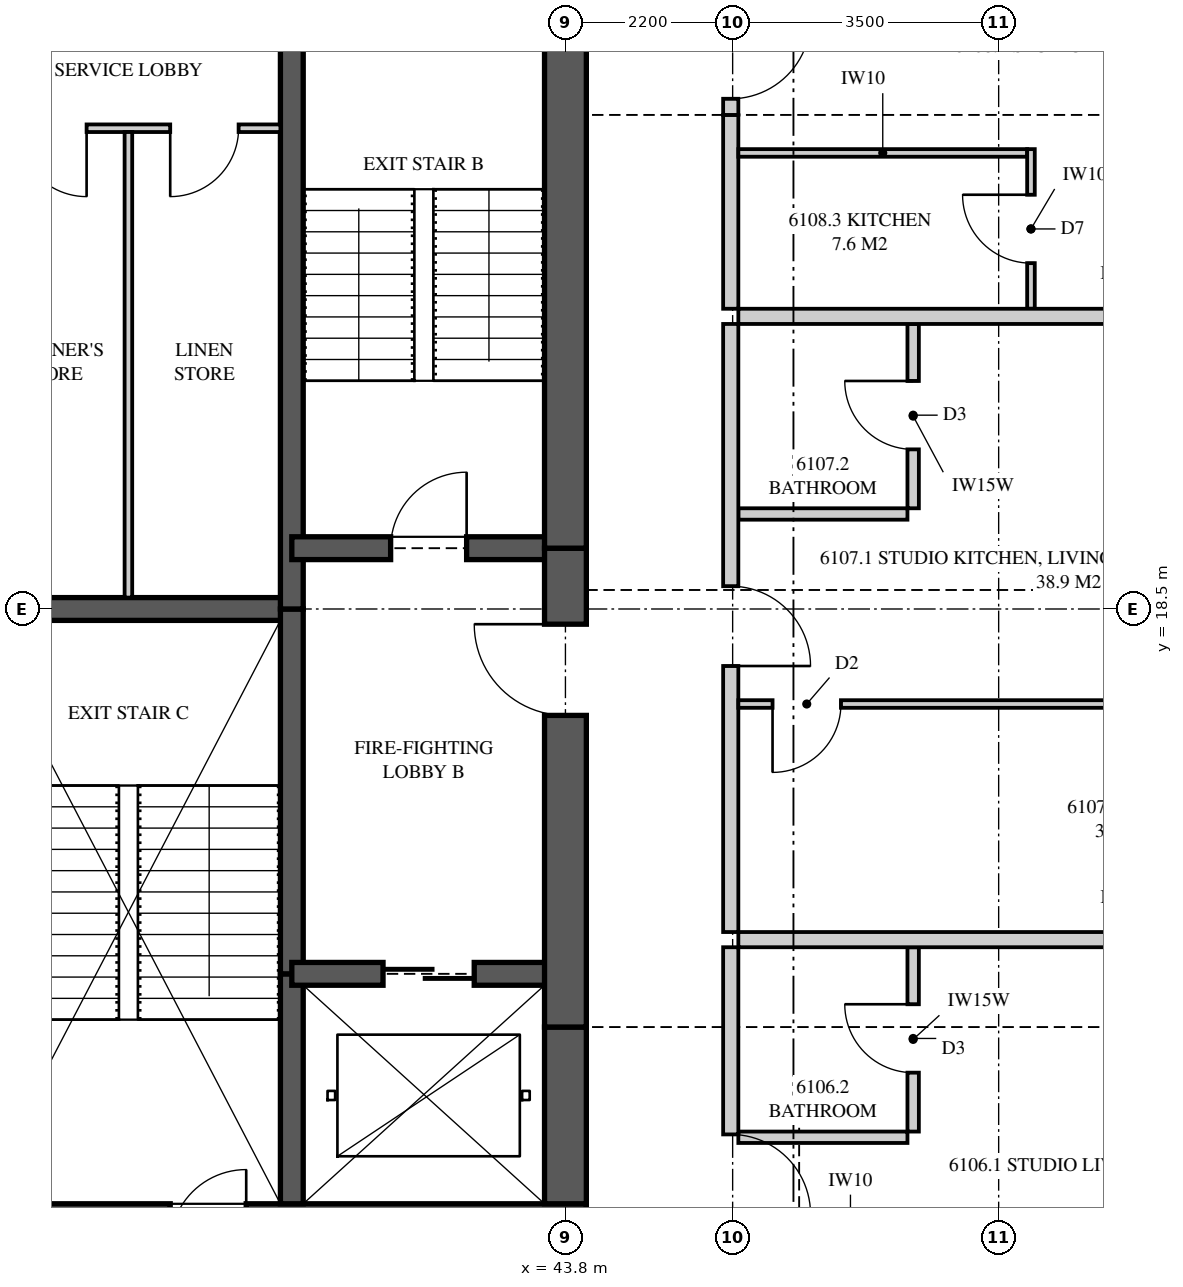
"""IFC4 building model, lengths in metres.
Left out: names, types, materials, properties, quantities, classifications, styles, units other than length and angle.
Written with IfcOpenShell. Run it as: python <this file> out.ifc"""

import sys

from ifc_helpers import new_model, si_unit, direction, frame, frame_2d, origin, place, context, subcontext, project, spatial, polyline, rectangle, outline, extrude, element, fill, save


model = new_model("IFC4")
c1 = context("Model", 3, precision=1e-05, world=origin(), true_north=direction((0.0, 1.0)))
c2 = subcontext(c1, "Body", "Model", "MODEL_VIEW")
j1 = project(units=[si_unit("LENGTHUNIT", "METRE"), si_unit("PLANEANGLEUNIT", "RADIAN")], contexts=[c1])
p1 = place(None, origin())
s1 = spatial("IfcSite", under=j1, at=p1, CompositionType="ELEMENT")
p2 = place(p1, origin())
s2 = spatial("IfcBuilding", under=s1, at=p2, CompositionType="ELEMENT")
p3 = place(p2, frame((0.0, 0.0, 224.95)))
s3 = spatial("IfcBuildingStorey", under=s2, at=p3, CompositionType="ELEMENT", Elevation=224.95)
p4 = place(p3, frame((35.9, 10.125, 0.0), z_axis=(0.0, 0.0, 1.0), x_axis=(1.0, 0.0, 0.0)))
e1 = element("IfcWall", 1, at=p4, inside=s3, PredefinedType="SHEAR", context=c2, shape_type="SweptSolid", body=[
    extrude(rectangle(XDim=8.175, YDim=1.1, at=frame_2d((4.087, 0.0))), origin(), (0.0, 0.0, 1.0), 3.5),
])
p5 = place(p4, frame((2.7, 0.0, 0.0)))
e2 = element("IfcOpeningElement", 2, at=p5, cuts=e1, PredefinedType="OPENING", context=c2, shape_type="SweptSolid", body=[
    extrude(rectangle(XDim=1.0, YDim=2.1, at=frame_2d((0.5, 1.05))), frame((0.0, 0.56, 0.0), z_axis=(0.0, -1.0, 0.0), x_axis=(1.0, 0.0, 0.0)), (0.0, 0.0, 1.0), 1.12),
])
p6 = place(p3, frame((43.8, 10.675, 0.0), z_axis=(0.0, 0.0, 1.0), x_axis=(0.0, 1.0, 0.0)))
e3 = element("IfcWall", 3, at=p6, inside=s3, PredefinedType="SHEAR", context=c2, shape_type="SweptSolid", body=[
    extrude(rectangle(XDim=2.325, YDim=0.55, at=frame_2d((1.163, 0.0))), origin(), (0.0, 0.0, 1.0), 3.5),
])
p7 = place(p3, frame((43.8, 13.0, 0.0), z_axis=(0.0, 0.0, 1.0), x_axis=(0.0, 1.0, 0.0)))
e4 = element("IfcWall", 4, at=p7, inside=s3, PredefinedType="SHEAR", context=c2, shape_type="SweptSolid", body=[
    extrude(rectangle(XDim=6.3, YDim=0.55, at=frame_2d((3.15, 0.0))), origin(), (0.0, 0.0, 1.0), 3.5),
])
p8 = place(p7, frame((4.1, 0.0, 0.0)))
e5 = element("IfcOpeningElement", 5, at=p8, cuts=e4, PredefinedType="OPENING", context=c2, shape_type="SweptSolid", body=[
    extrude(rectangle(XDim=1.2, YDim=2.2, at=frame_2d((0.6, 1.1))), frame((0.0, 0.285, 0.0), z_axis=(0.0, -1.0, 0.0), x_axis=(1.0, 0.0, 0.0)), (0.0, 0.0, 1.0), 0.57),
])
p9 = place(p3, frame((43.8, 19.3, 0.0), z_axis=(0.0, 0.0, 1.0), x_axis=(0.0, 1.0, 0.0)))
e6 = element("IfcWall", 6, at=p9, inside=s3, PredefinedType="SHEAR", context=c2, shape_type="SweptSolid", body=[
    extrude(rectangle(XDim=7.025, YDim=0.55, at=frame_2d((3.512, 0.0))), origin(), (0.0, 0.0, 1.0), 3.5),
])
p10 = place(p3, frame((40.2, 10.675, 0.0), z_axis=(0.0, 0.0, 1.0), x_axis=(0.0, 1.0, 0.0)))
e7 = element("IfcWall", 7, at=p10, inside=s3, PredefinedType="SHEAR", context=c2, shape_type="SweptSolid", body=[
    extrude(rectangle(XDim=3.025, YDim=0.3, at=frame_2d((1.512, 0.0))), origin(), (0.0, 0.0, 1.0), 3.5),
])
p11 = place(p3, frame((40.2, 13.7, 0.0), z_axis=(0.0, 0.0, 1.0), x_axis=(0.0, 1.0, 0.0)))
e8 = element("IfcWall", 8, at=p11, inside=s3, PredefinedType="SHEAR", context=c2, shape_type="SweptSolid", body=[
    extrude(rectangle(XDim=4.8, YDim=0.3, at=frame_2d((2.4, 0.0))), origin(), (0.0, 0.0, 1.0), 3.5),
])
p12 = place(p3, frame((40.2, 18.5, 0.0), z_axis=(0.0, 0.0, 1.0), x_axis=(0.0, 1.0, 0.0)))
e9 = element("IfcWall", 9, at=p12, inside=s3, PredefinedType="SHEAR", context=c2, shape_type="SweptSolid", body=[
    extrude(rectangle(XDim=7.825, YDim=0.3, at=frame_2d((3.913, 0.0))), origin(), (0.0, 0.0, 1.0), 3.5),
])
p13 = place(p3, frame((35.9, 18.5, 0.0), z_axis=(0.0, 0.0, 1.0), x_axis=(1.0, 0.0, 0.0)))
e10 = element("IfcWall", 10, at=p13, inside=s3, PredefinedType="SHEAR", context=c2, shape_type="SweptSolid", body=[
    extrude(rectangle(XDim=4.3, YDim=0.3, at=frame_2d((2.15, 0.0))), origin(), (0.0, 0.0, 1.0), 3.5),
])
p14 = place(p3, frame((40.2, 13.7, 0.0), z_axis=(0.0, 0.0, 1.0), x_axis=(1.0, 0.0, 0.0)))
e11 = element("IfcWall", 11, at=p14, inside=s3, PredefinedType="SHEAR", context=c2, shape_type="SweptSolid", body=[
    extrude(rectangle(XDim=3.6, YDim=0.3, at=frame_2d((1.8, 0.0))), origin(), (0.0, 0.0, 1.0), 3.5),
])
p15 = place(p14, frame((1.2, 0.0, 0.0)))
e12 = element("IfcOpeningElement", 12, at=p15, cuts=e11, PredefinedType="OPENING", context=c2, shape_type="SweptSolid", body=[
    extrude(rectangle(XDim=1.2, YDim=2.1, at=frame_2d((0.6, 1.05))), frame((0.0, 0.16, 0.0), z_axis=(0.0, -1.0, 0.0), x_axis=(1.0, 0.0, 0.0)), (0.0, 0.0, 1.0), 0.32),
])
p16 = place(p3, frame((40.2, 19.3, 0.0), z_axis=(0.0, 0.0, 1.0), x_axis=(1.0, 0.0, 0.0)))
e13 = element("IfcWall", 13, at=p16, inside=s3, PredefinedType="SHEAR", context=c2, shape_type="SweptSolid", body=[
    extrude(rectangle(XDim=3.6, YDim=0.3, at=frame_2d((1.8, 0.0))), origin(), (0.0, 0.0, 1.0), 3.5),
])
p17 = place(p16, frame((1.3, 0.0, 0.0)))
e14 = element("IfcOpeningElement", 14, at=p17, cuts=e13, PredefinedType="OPENING", context=c2, shape_type="SweptSolid", body=[
    extrude(rectangle(XDim=1.0, YDim=2.1, at=frame_2d((0.5, 1.05))), frame((0.0, 0.16, 0.0), z_axis=(0.0, -1.0, 0.0), x_axis=(1.0, 0.0, 0.0)), (0.0, 0.0, 1.0), 0.32),
])
p18 = place(p3, frame((56.325, 14.15, 0.0), z_axis=(0.0, 0.0, 1.0), x_axis=(-1.0, 0.0, 0.0)))
e15 = element("IfcWall", 15, at=p18, inside=s3, PredefinedType="PARTITIONING", context=c2, shape_type="SweptSolid", body=[
    extrude(outline(polyline([(0.529, 2.3), (0.0, 2.3), (0.0, 0.0), (0.529, 0.0), (0.529, 0.396), (1.021, 0.396), (1.021, 0.0), (10.25, 0.0), (10.25, 2.66), (1.685, 2.66), (1.685, 2.3), (1.021, 2.3), (1.021, 1.904), (0.529, 1.904), (0.529, 2.3)])), frame((0.0, 0.1, 0.0), z_axis=(0.0, -1.0, 0.0), x_axis=(1.0, 0.0, 0.0)), (0.0, 0.0, 1.0), 0.2),
])
p19 = place(p3, frame((45.975, 8.025, 0.0), z_axis=(0.0, 0.0, 1.0), x_axis=(0.0, 1.0, 0.0)))
e16 = element("IfcWall", 16, at=p19, inside=s3, PredefinedType="PARTITIONING", context=c2, shape_type="SweptSolid", body=[
    extrude(outline(polyline([(0.0, 0.0), (6.025, 0.0), (6.025, 3.26), (6.025, 2.66), (5.085, 2.66), (0.0, 2.66), (0.0, 3.26), (0.0, 0.0)])), frame((0.0, 0.1, 0.0), z_axis=(0.0, -1.0, 0.0), x_axis=(1.0, 0.0, 0.0)), (0.0, 0.0, 1.0), 0.2),
])
p20 = place(p19, frame((2.512, 0.0, 0.0)))
e17 = element("IfcOpeningElement", 17, at=p20, cuts=e16, PredefinedType="OPENING", context=c2, shape_type="SweptSolid", body=[
    extrude(rectangle(XDim=1.05, YDim=2.2, at=frame_2d((0.525, 1.1))), frame((0.0, 0.11, 0.0), z_axis=(0.0, -1.0, 0.0), x_axis=(1.0, 0.0, 0.0)), (0.0, 0.0, 1.0), 0.22),
])
p21 = place(p3, frame((48.375, 11.625, 0.0), z_axis=(0.0, 0.0, 1.0), x_axis=(0.0, 1.0, 0.0)))
e18 = element("IfcWall", 18, at=p21, inside=s3, PredefinedType="PLUMBINGWALL", context=c2, shape_type="SweptSolid", body=[
    extrude(outline(polyline([(0.0, 0.0), (2.425, 0.0), (2.425, 3.26), (2.425, 2.66), (0.09, 2.66), (0.09, 3.26), (0.0, 3.26), (0.0, 0.0)])), frame((0.0, 0.075, 0.0), z_axis=(0.0, -1.0, 0.0), x_axis=(1.0, 0.0, 0.0)), (0.0, 0.0, 1.0), 0.15),
])
p22 = place(p21, frame((0.775, 0.0, 0.0)))
e19 = element("IfcOpeningElement", 19, at=p22, cuts=e18, PredefinedType="OPENING", context=c2, shape_type="SweptSolid", body=[
    extrude(rectangle(XDim=0.9, YDim=2.1, at=frame_2d((0.45, 1.05))), frame((0.0, 0.085, 0.0), z_axis=(0.0, -1.0, 0.0), x_axis=(1.0, 0.0, 0.0)), (0.0, 0.0, 1.0), 0.17),
])
p23 = place(p3, frame((48.3, 11.55, 0.0), z_axis=(0.0, 0.0, 1.0), x_axis=(-1.0, 0.0, 0.0)))
e20 = element("IfcWall", 20, at=p23, inside=s3, PredefinedType="PLUMBINGWALL", context=c2, shape_type="SweptSolid", body=[
    extrude(outline(polyline([(0.0, 0.0), (2.225, 0.0), (2.225, 3.26), (2.225, 2.66), (0.14, 2.66), (0.14, 3.26), (0.0, 3.26), (0.0, 0.0)])), frame((0.0, 0.075, 0.0), z_axis=(0.0, -1.0, 0.0), x_axis=(1.0, 0.0, 0.0)), (0.0, 0.0, 1.0), 0.15),
])
p24 = place(p3, frame((56.325, 22.35, 0.0), z_axis=(0.0, 0.0, 1.0), x_axis=(-1.0, 0.0, 0.0)))
e21 = element("IfcWall", 21, at=p24, inside=s3, PredefinedType="PARTITIONING", context=c2, shape_type="SweptSolid", body=[
    extrude(outline(polyline([(0.0, 0.0), (10.25, 0.0), (10.25, 3.26), (1.685, 3.26), (1.685, 2.3), (0.0, 2.3), (0.0, 3.26), (0.0, 0.0)])), frame((0.0, 0.1, 0.0), z_axis=(0.0, -1.0, 0.0), x_axis=(1.0, 0.0, 0.0)), (0.0, 0.0, 1.0), 0.2),
])
p25 = place(p3, frame((45.975, 14.25, 0.0), z_axis=(0.0, 0.0, 1.0), x_axis=(0.0, 1.0, 0.0)))
e22 = element("IfcWall", 22, at=p25, inside=s3, PredefinedType="PARTITIONING", context=c2, shape_type="SweptSolid", body=[
    extrude(outline(polyline([(0.0, 0.0), (8.0, 0.0), (8.0, 3.26), (5.81, 3.26), (5.81, 2.66), (3.19, 2.66), (3.19, 3.26), (0.06, 3.26), (0.06, 2.66), (0.0, 2.66), (0.0, 3.26), (0.0, 0.0)])), frame((0.0, 0.1, 0.0), z_axis=(0.0, -1.0, 0.0), x_axis=(1.0, 0.0, 0.0)), (0.0, 0.0, 1.0), 0.2),
])
p26 = place(p25, frame((3.5, 0.0, 0.0)))
e23 = element("IfcOpeningElement", 23, at=p26, cuts=e22, PredefinedType="OPENING", context=c2, shape_type="SweptSolid", body=[
    extrude(rectangle(XDim=1.05, YDim=2.2, at=frame_2d((0.525, 1.1))), frame((0.0, 0.11, 0.0), z_axis=(0.0, -1.0, 0.0), x_axis=(1.0, 0.0, 0.0)), (0.0, 0.0, 1.0), 0.22),
])
p27 = place(p3, frame((48.375, 19.825, 0.0), z_axis=(0.0, 0.0, 1.0), x_axis=(0.0, 1.0, 0.0)))
e24 = element("IfcWall", 24, at=p27, inside=s3, PredefinedType="PLUMBINGWALL", context=c2, shape_type="SweptSolid", body=[
    extrude(outline(polyline([(0.0, 0.0), (2.425, 0.0), (2.425, 3.26), (0.21, 3.26), (0.21, 2.66), (0.0, 2.66), (0.0, 3.26), (0.0, 0.0)])), frame((0.0, 0.075, 0.0), z_axis=(0.0, -1.0, 0.0), x_axis=(1.0, 0.0, 0.0)), (0.0, 0.0, 1.0), 0.15),
])
p28 = place(p27, frame((0.775, 0.0, 0.0)))
e25 = element("IfcOpeningElement", 25, at=p28, cuts=e24, PredefinedType="OPENING", context=c2, shape_type="SweptSolid", body=[
    extrude(rectangle(XDim=0.9, YDim=2.1, at=frame_2d((0.45, 1.05))), frame((0.0, 0.085, 0.0), z_axis=(0.0, -1.0, 0.0), x_axis=(1.0, 0.0, 0.0)), (0.0, 0.0, 1.0), 0.17),
])
p29 = place(p3, frame((48.3, 19.75, 0.0), z_axis=(0.0, 0.0, 1.0), x_axis=(-1.0, 0.0, 0.0)))
e26 = element("IfcWall", 26, at=p29, inside=s3, PredefinedType="PLUMBINGWALL", context=c2, shape_type="SweptSolid", body=[
    extrude(outline(polyline([(0.0, 0.0), (2.225, 0.0), (2.225, 3.26), (2.225, 2.66), (0.0, 2.66), (0.0, 3.26), (0.0, 0.0)])), frame((0.0, 0.075, 0.0), z_axis=(0.0, -1.0, 0.0), x_axis=(1.0, 0.0, 0.0)), (0.0, 0.0, 1.0), 0.15),
])
p30 = place(p3, frame((56.325, 17.25, 0.0), z_axis=(0.0, 0.0, 1.0), x_axis=(-1.0, 0.0, 0.0)))
e27 = element("IfcWall", 27, at=p30, inside=s3, PredefinedType="PARTITIONING", context=c2, shape_type="SweptSolid", body=[
    extrude(outline(polyline([(0.0, 0.0), (10.25, 0.0), (10.25, 3.26), (1.635, 3.26), (1.635, 2.3), (0.0, 2.3), (0.0, 3.26), (0.0, 0.0)])), frame((0.0, 0.05, 0.0), z_axis=(0.0, -1.0, 0.0), x_axis=(1.0, 0.0, 0.0)), (0.0, 0.0, 1.0), 0.1),
])
p31 = place(p30, frame((8.9, 0.0, 0.0)))
e28 = element("IfcOpeningElement", 28, at=p31, cuts=e27, PredefinedType="OPENING", context=c2, shape_type="SweptSolid", body=[
    extrude(rectangle(XDim=0.9, YDim=2.1, at=frame_2d((0.45, 1.05))), frame((0.0, 0.06, 0.0), z_axis=(0.0, -1.0, 0.0), x_axis=(1.0, 0.0, 0.0)), (0.0, 0.0, 1.0), 0.12),
])
p32 = place(p3, frame((45.975, 22.45, 0.0), z_axis=(0.0, 0.0, 1.0), x_axis=(0.0, 1.0, 0.0)))
e29 = element("IfcWall", 29, at=p32, inside=s3, PredefinedType="PARTITIONING", context=c2, shape_type="SweptSolid", body=[
    extrude(outline(polyline([(0.0, 0.0), (2.55, 0.0), (2.55, 2.66), (1.24, 2.66), (1.24, 3.26), (0.0, 3.26), (0.0, 0.0)])), frame((0.0, 0.1, 0.0), z_axis=(0.0, -1.0, 0.0), x_axis=(1.0, 0.0, 0.0)), (0.0, 0.0, 1.0), 0.2),
])
p33 = place(p3, frame((45.975, 25.0, 0.0), z_axis=(0.0, 0.0, 1.0), x_axis=(0.0, 1.0, 0.0)))
e30 = element("IfcWall", 30, at=p33, inside=s3, PredefinedType="PARTITIONING", context=c2, shape_type="SweptSolid", body=[
    extrude(rectangle(XDim=3.975, YDim=0.2, at=frame_2d((1.988, 0.0))), origin(), (0.0, 0.0, 1.0), 2.66),
])
p34 = place(p33, frame((0.212, 0.0, 0.0)))
e31 = element("IfcOpeningElement", 31, at=p34, cuts=e30, PredefinedType="OPENING", context=c2, shape_type="SweptSolid", body=[
    extrude(rectangle(XDim=1.05, YDim=2.2, at=frame_2d((0.525, 1.1))), frame((0.0, 0.11, 0.0), z_axis=(0.0, -1.0, 0.0), x_axis=(1.0, 0.0, 0.0)), (0.0, 0.0, 1.0), 0.22),
])
p35 = place(p3, frame((49.925, 22.45, 0.0), z_axis=(0.0, 0.0, 1.0), x_axis=(0.0, 1.0, 0.0)))
e32 = element("IfcWall", 32, at=p35, inside=s3, PredefinedType="PARTITIONING", context=c2, shape_type="SweptSolid", body=[
    extrude(outline(polyline([(0.0, 0.0), (2.1, 0.0), (2.1, 3.26), (2.1, 2.66), (1.29, 2.66), (1.29, 3.26), (0.0, 3.26), (0.0, 0.0)])), frame((0.0, 0.05, 0.0), z_axis=(0.0, -1.0, 0.0), x_axis=(1.0, 0.0, 0.0)), (0.0, 0.0, 1.0), 0.1),
])
p36 = place(p35, frame((0.6, 0.0, 0.0)))
e33 = element("IfcOpeningElement", 33, at=p36, cuts=e32, PredefinedType="OPENING", context=c2, shape_type="SweptSolid", body=[
    extrude(rectangle(XDim=0.9, YDim=2.1, at=frame_2d((0.45, 1.05))), frame((0.0, 0.06, 0.0), z_axis=(0.0, -1.0, 0.0), x_axis=(1.0, 0.0, 0.0)), (0.0, 0.0, 1.0), 0.12),
])
p37 = place(p3, frame((46.075, 24.5, 0.0), z_axis=(0.0, 0.0, 1.0), x_axis=(1.0, 0.0, 0.0)))
e34 = element("IfcWall", 34, at=p37, inside=s3, PredefinedType="PARTITIONING", context=c2, shape_type="SweptSolid", body=[
    extrude(outline(polyline([(0.0, 0.0), (3.8, 0.0), (3.8, 3.26), (3.8, 2.66), (0.0, 2.66), (0.0, 3.26), (0.0, 0.0)])), frame((0.0, 0.05, 0.0), z_axis=(0.0, -1.0, 0.0), x_axis=(1.0, 0.0, 0.0)), (0.0, 0.0, 1.0), 0.1),
])
p38 = place(p3, frame((36.05, 24.825, 0.0), z_axis=(0.0, 0.0, 1.0), x_axis=(1.0, 0.0, 0.0)))
e35 = element("IfcWall", 35, at=p38, inside=s3, PredefinedType="PARTITIONING", context=c2, shape_type="SweptSolid", body=[
    extrude(rectangle(XDim=4.0, YDim=0.1, at=frame_2d((2.0, 0.0))), origin(), (0.0, 0.0, 1.0), 3.26),
])
p39 = place(p38, frame((0.55, 0.0, 0.0)))
e36 = element("IfcOpeningElement", 36, at=p39, cuts=e35, PredefinedType="OPENING", context=c2, shape_type="SweptSolid", body=[
    extrude(rectangle(XDim=0.9, YDim=2.1, at=frame_2d((0.45, 1.05))), frame((0.0, 0.06, 0.0), z_axis=(0.0, -1.0, 0.0), x_axis=(1.0, 0.0, 0.0)), (0.0, 0.0, 1.0), 0.12),
])
p40 = place(p38, frame((2.55, 0.0, 0.0)))
e37 = element("IfcOpeningElement", 37, at=p40, cuts=e35, PredefinedType="OPENING", context=c2, shape_type="SweptSolid", body=[
    extrude(rectangle(XDim=0.9, YDim=2.1, at=frame_2d((0.45, 1.05))), frame((0.0, 0.06, 0.0), z_axis=(0.0, -1.0, 0.0), x_axis=(1.0, 0.0, 0.0)), (0.0, 0.0, 1.0), 0.12),
])
p41 = place(p3, frame((38.05, 18.65, 0.0), z_axis=(0.0, 0.0, 1.0), x_axis=(0.0, 1.0, 0.0)))
e38 = element("IfcWall", 38, at=p41, inside=s3, PredefinedType="PARTITIONING", context=c2, shape_type="SweptSolid", body=[
    extrude(rectangle(XDim=6.125, YDim=0.1, at=frame_2d((3.062, 0.0))), origin(), (0.0, 0.0, 1.0), 3.26),
])
p42 = place(p20, frame((1.05, 0.0, 0.0), z_axis=(0.0, 0.0, 1.0), x_axis=(-1.0, 0.0, 0.0)))
e39 = element("IfcDoor", 39, at=p42, inside=s3, OperationType="SINGLE_SWING_RIGHT", PredefinedType="DOOR", context=c2, shape_type="SweptSolid", body=[
    extrude(rectangle(XDim=1.05, YDim=2.2, at=frame_2d((0.525, 1.1))), frame((0.0, 0.025, 0.0), z_axis=(0.0, -1.0, 0.0), x_axis=(1.0, 0.0, 0.0)), (0.0, 0.0, 1.0), 0.05),
])
fill(e17, e39)
p43 = place(p22, origin())
e40 = element("IfcDoor", 40, at=p43, inside=s3, OperationType="SINGLE_SWING_RIGHT", PredefinedType="DOOR", context=c2, shape_type="SweptSolid", body=[
    extrude(rectangle(XDim=0.9, YDim=2.1, at=frame_2d((0.45, 1.05))), frame((0.0, 0.025, 0.0), z_axis=(0.0, -1.0, 0.0), x_axis=(1.0, 0.0, 0.0)), (0.0, 0.0, 1.0), 0.05),
])
fill(e19, e40)
p44 = place(p26, frame((1.05, 0.0, 0.0), z_axis=(0.0, 0.0, 1.0), x_axis=(-1.0, 0.0, 0.0)))
e41 = element("IfcDoor", 41, at=p44, inside=s3, OperationType="SINGLE_SWING_RIGHT", PredefinedType="DOOR", context=c2, shape_type="SweptSolid", body=[
    extrude(rectangle(XDim=1.05, YDim=2.2, at=frame_2d((0.525, 1.1))), frame((0.0, 0.025, 0.0), z_axis=(0.0, -1.0, 0.0), x_axis=(1.0, 0.0, 0.0)), (0.0, 0.0, 1.0), 0.05),
])
fill(e23, e41)
p45 = place(p28, origin())
e42 = element("IfcDoor", 42, at=p45, inside=s3, OperationType="SINGLE_SWING_RIGHT", PredefinedType="DOOR", context=c2, shape_type="SweptSolid", body=[
    extrude(rectangle(XDim=0.9, YDim=2.1, at=frame_2d((0.45, 1.05))), frame((0.0, 0.025, 0.0), z_axis=(0.0, -1.0, 0.0), x_axis=(1.0, 0.0, 0.0)), (0.0, 0.0, 1.0), 0.05),
])
fill(e25, e42)
p46 = place(p31, origin())
e43 = element("IfcDoor", 43, at=p46, inside=s3, OperationType="SINGLE_SWING_RIGHT", PredefinedType="DOOR", context=c2, shape_type="SweptSolid", body=[
    extrude(rectangle(XDim=0.9, YDim=2.1, at=frame_2d((0.45, 1.05))), frame((0.0, 0.025, 0.0), z_axis=(0.0, -1.0, 0.0), x_axis=(1.0, 0.0, 0.0)), (0.0, 0.0, 1.0), 0.05),
])
fill(e28, e43)
p47 = place(p34, frame((1.05, 0.0, 0.0), z_axis=(0.0, 0.0, 1.0), x_axis=(-1.0, 0.0, 0.0)))
e44 = element("IfcDoor", 44, at=p47, inside=s3, OperationType="SINGLE_SWING_LEFT", PredefinedType="DOOR", context=c2, shape_type="SweptSolid", body=[
    extrude(rectangle(XDim=1.05, YDim=2.2, at=frame_2d((0.525, 1.1))), frame((0.0, 0.025, 0.0), z_axis=(0.0, -1.0, 0.0), x_axis=(1.0, 0.0, 0.0)), (0.0, 0.0, 1.0), 0.05),
])
fill(e31, e44)
p48 = place(p36, origin())
e45 = element("IfcDoor", 45, at=p48, inside=s3, OperationType="SINGLE_SWING_RIGHT", PredefinedType="DOOR", context=c2, shape_type="SweptSolid", body=[
    extrude(rectangle(XDim=0.9, YDim=2.1, at=frame_2d((0.45, 1.05))), frame((0.0, 0.025, 0.0), z_axis=(0.0, -1.0, 0.0), x_axis=(1.0, 0.0, 0.0)), (0.0, 0.0, 1.0), 0.05),
])
fill(e33, e45)
p49 = place(p39, frame((0.9, 0.0, 0.0), z_axis=(0.0, 0.0, 1.0), x_axis=(-1.0, 0.0, 0.0)))
e46 = element("IfcDoor", 46, at=p49, inside=s3, OperationType="SINGLE_SWING_LEFT", PredefinedType="DOOR", context=c2, shape_type="SweptSolid", body=[
    extrude(rectangle(XDim=0.9, YDim=2.1, at=frame_2d((0.45, 1.05))), frame((0.0, 0.025, 0.0), z_axis=(0.0, -1.0, 0.0), x_axis=(1.0, 0.0, 0.0)), (0.0, 0.0, 1.0), 0.05),
])
fill(e36, e46)
p50 = place(p40, frame((0.9, 0.0, 0.0), z_axis=(0.0, 0.0, 1.0), x_axis=(-1.0, 0.0, 0.0)))
e47 = element("IfcDoor", 47, at=p50, inside=s3, OperationType="SINGLE_SWING_RIGHT", PredefinedType="DOOR", context=c2, shape_type="SweptSolid", body=[
    extrude(rectangle(XDim=0.9, YDim=2.1, at=frame_2d((0.45, 1.05))), frame((0.0, 0.025, 0.0), z_axis=(0.0, -1.0, 0.0), x_axis=(1.0, 0.0, 0.0)), (0.0, 0.0, 1.0), 0.05),
])
fill(e37, e47)
p51 = place(p17, origin())
e48 = element("IfcDoor", 48, at=p51, inside=s3, OperationType="SINGLE_SWING_RIGHT", PredefinedType="DOOR", context=c2, shape_type="SweptSolid", body=[
    extrude(rectangle(XDim=1.0, YDim=2.1, at=frame_2d((0.5, 1.05))), frame((0.0, 0.025, 0.0), z_axis=(0.0, -1.0, 0.0), x_axis=(1.0, 0.0, 0.0)), (0.0, 0.0, 1.0), 0.05),
])
fill(e14, e48)
p52 = place(p8, origin())
e49 = element("IfcDoor", 49, at=p52, inside=s3, OperationType="SINGLE_SWING_RIGHT", PredefinedType="DOOR", context=c2, shape_type="SweptSolid", body=[
    extrude(rectangle(XDim=1.2, YDim=2.2, at=frame_2d((0.6, 1.1))), frame((0.0, 0.025, 0.0), z_axis=(0.0, -1.0, 0.0), x_axis=(1.0, 0.0, 0.0)), (0.0, 0.0, 1.0), 0.05),
])
fill(e5, e49)
p53 = place(p15, origin())
e50 = element("IfcDoor", 50, at=p53, inside=s3, OperationType="SLIDING_TO_LEFT", PredefinedType="DOOR", context=c2, shape_type="SweptSolid", body=[
    extrude(rectangle(XDim=1.2, YDim=2.1, at=frame_2d((0.6, 1.05))), frame((0.0, 0.025, 0.0), z_axis=(0.0, -1.0, 0.0), x_axis=(1.0, 0.0, 0.0)), (0.0, 0.0, 1.0), 0.05),
])
fill(e12, e50)
save(model, sys.argv[1])
